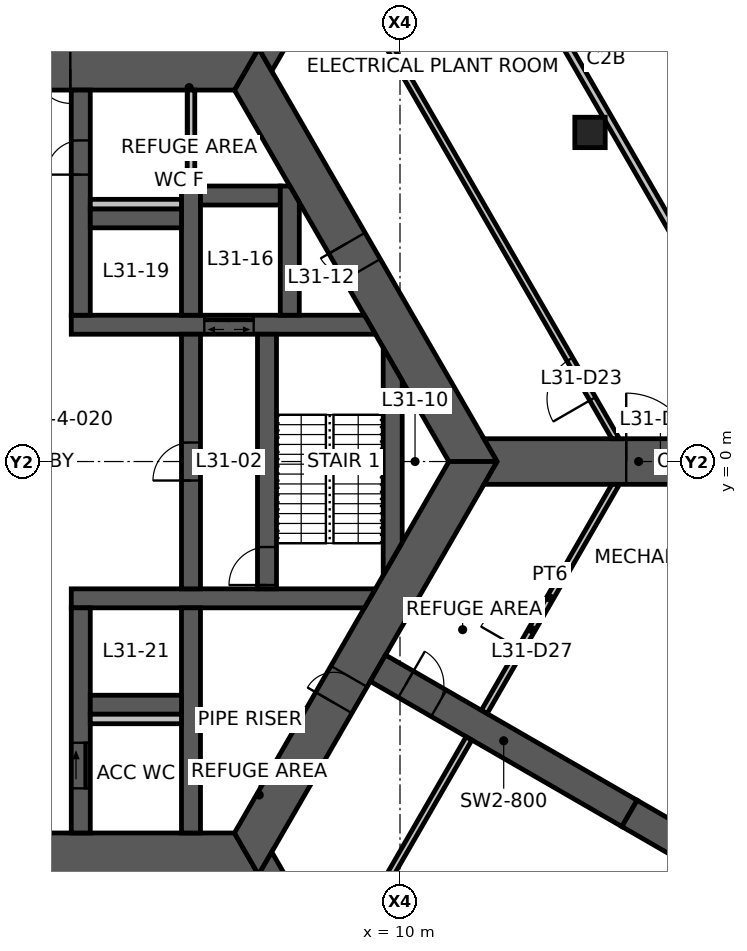
"""IFC4 building model, lengths in metres.
Left out: names, types, materials, properties, quantities, classifications, styles, units other than length and angle.
Written with IfcOpenShell. Run it as: python <this file> out.ifc"""

import sys

from ifc_helpers import new_model, si_unit, direction, frame, frame_2d, origin, origin_2d, place, context, subcontext, project, spatial, polyline, rectangle, hollow_rectangle, outline, extrude, element, fill, save


model = new_model("IFC4")
c1 = context("Model", 3, precision=1e-05, world=origin(), true_north=direction((0.0, 1.0)))
c2 = subcontext(c1, "Body", "Model", "MODEL_VIEW")
j1 = project(units=[si_unit("LENGTHUNIT", "METRE"), si_unit("PLANEANGLEUNIT", "RADIAN")], contexts=[c1])
p1 = place(None, origin())
s1 = spatial("IfcSite", under=j1, at=p1, CompositionType="ELEMENT")
p2 = place(p1, origin())
s2 = spatial("IfcBuilding", under=s1, at=p2, CompositionType="ELEMENT")
p3 = place(p2, frame((0.0, 0.0, 123.6)))
s3 = spatial("IfcBuildingStorey", under=s2, at=p3, CompositionType="ELEMENT", Elevation=123.6)
p4 = place(p3, frame((15.0, 8.66, 0.0), z_axis=(0.0, 0.0, 1.0), x_axis=(1.0, 0.0, 0.0)))
e1 = element("IfcColumn", 1, at=p4, inside=s3, PredefinedType="COLUMN", context=c2, shape_type="SweptSolid", body=[
    extrude(hollow_rectangle(XDim=0.8, YDim=0.8, WallThickness=0.045, at=origin_2d()), origin(), (0.0, 0.0, 1.0), 5.0),
])
p5 = place(p3, frame((11.922, 0.0, 0.0), z_axis=(0.0, 0.0, 1.0), x_axis=(-0.500004296715, 0.866022923061, 0.0)))
e2 = element("IfcWall", 2, at=p5, inside=s3, PredefinedType="SHEAR", context=c2, shape_type="SweptSolid", body=[
    extrude(outline(polyline([(-0.318, -0.55), (5.835, -0.55), (6.635, -0.55), (12.24, -0.55), (11.605, 0.55), (6.635, 0.55), (5.835, 0.55), (0.318, 0.55), (-0.318, -0.55)])), origin(), (0.0, 0.0, 1.0), 5.0),
])
p6 = place(p5, frame((5.835, 0.0, 0.0)))
e3 = element("IfcOpeningElement", 3, at=p6, cuts=e2, PredefinedType="OPENING", context=c2, shape_type="SweptSolid", body=[
    extrude(rectangle(XDim=0.8, YDim=2.1, at=frame_2d((0.4, 1.05))), frame((0.0, 0.56, 0.0), z_axis=(0.0, -1.0, 0.0), x_axis=(1.0, 0.0, 0.0)), (0.0, 0.0, 1.0), 1.12),
])
p7 = place(p3, frame((5.961, 10.325, 0.0), z_axis=(0.0, 0.0, 1.0), x_axis=(-1.0, 0.0, 0.0)))
e4 = element("IfcWall", 4, at=p7, inside=s3, PredefinedType="SHEAR", context=c2, shape_type="SweptSolid", body=[
    extrude(outline(polyline([(-0.318, -0.55), (4.636, -0.55), (5.536, -0.55), (6.386, -0.55), (7.286, -0.55), (12.24, -0.55), (11.605, 0.55), (7.286, 0.55), (6.386, 0.55), (5.536, 0.55), (4.636, 0.55), (0.318, 0.55), (-0.318, -0.55)])), origin(), (0.0, 0.0, 1.0), 5.0),
])
p8 = place(p7, frame((6.386, 0.0, 0.0)))
e5 = element("IfcOpeningElement", 5, at=p8, cuts=e4, PredefinedType="OPENING", context=c2, shape_type="SweptSolid", body=[
    extrude(rectangle(XDim=0.9, YDim=2.1, at=frame_2d((0.45, 1.05))), frame((0.0, 0.56, 0.0), z_axis=(0.0, -1.0, 0.0), x_axis=(1.0, 0.0, 0.0)), (0.0, 0.0, 1.0), 1.12),
])
p9 = place(p7, frame((4.636, 0.0, 0.0)))
e6 = element("IfcOpeningElement", 6, at=p9, cuts=e4, PredefinedType="OPENING", context=c2, shape_type="SweptSolid", body=[
    extrude(rectangle(XDim=0.9, YDim=2.1, at=frame_2d((0.45, 1.05))), frame((0.0, 0.56, 0.0), z_axis=(0.0, -1.0, 0.0), x_axis=(1.0, 0.0, 0.0)), (0.0, 0.0, 1.0), 1.12),
])
p10 = place(p3, frame((-5.961, -10.325, 0.0), z_axis=(0.0, 0.0, 1.0), x_axis=(1.0, 0.0, 0.0)))
e7 = element("IfcWall", 7, at=p10, inside=s3, PredefinedType="SHEAR", context=c2, shape_type="SweptSolid", body=[
    extrude(outline(polyline([(-0.318, -0.55), (5.461, -0.55), (6.461, -0.55), (12.24, -0.55), (11.605, 0.55), (6.461, 0.55), (5.461, 0.55), (0.318, 0.55), (-0.318, -0.55)])), origin(), (0.0, 0.0, 1.0), 5.0),
])
p11 = place(p10, frame((5.461, 0.0, 0.0)))
e8 = element("IfcOpeningElement", 8, at=p11, cuts=e7, PredefinedType="OPENING", context=c2, shape_type="SweptSolid", body=[
    extrude(rectangle(XDim=1.0, YDim=2.1, at=frame_2d((0.5, 1.05))), frame((0.0, 0.56, 0.0), z_axis=(0.0, -1.0, 0.0), x_axis=(1.0, 0.0, 0.0)), (0.0, 0.0, 1.0), 1.12),
])
p12 = place(p3, frame((5.961, -10.325, 0.0), z_axis=(0.0, 0.0, 1.0), x_axis=(0.500004296715, 0.866022923061, 0.0)))
e9 = element("IfcWall", 9, at=p12, inside=s3, PredefinedType="SHEAR", context=c2, shape_type="SweptSolid", body=[
    extrude(outline(polyline([(-0.318, -0.55), (4.594, -0.55), (5.394, -0.55), (12.24, -0.55), (11.605, 0.55), (5.394, 0.55), (4.594, 0.55), (0.318, 0.55), (-0.318, -0.55)])), origin(), (0.0, 0.0, 1.0), 5.0),
])
p13 = place(p12, frame((4.594, 0.0, 0.0)))
e10 = element("IfcOpeningElement", 10, at=p13, cuts=e9, PredefinedType="OPENING", context=c2, shape_type="SweptSolid", body=[
    extrude(rectangle(XDim=0.8, YDim=2.1, at=frame_2d((0.4, 1.05))), frame((0.0, 0.56, 0.0), z_axis=(0.0, -1.0, 0.0), x_axis=(1.0, 0.0, 0.0)), (0.0, 0.0, 1.0), 1.12),
])
p14 = place(p3, frame((9.418, -5.438, 0.0), z_axis=(0.0, 0.0, 1.0), x_axis=(0.866029782078, -0.499992416496, 0.0)))
e11 = element("IfcWall", 11, at=p14, inside=s3, PredefinedType="SHEAR", context=c2, shape_type="SweptSolid", body=[
    extrude(rectangle(XDim=7.646, YDim=0.8, at=frame_2d((3.823, 0.0))), origin(), (0.0, 0.0, 1.0), 5.0),
])
p15 = place(p14, frame((0.85, 0.0, 0.0)))
e12 = element("IfcOpeningElement", 12, at=p15, cuts=e11, PredefinedType="OPENING", context=c2, shape_type="SweptSolid", body=[
    extrude(rectangle(XDim=1.0, YDim=2.1, at=frame_2d((0.5, 1.05))), frame((0.0, 0.41, 0.0), z_axis=(0.0, -1.0, 0.0), x_axis=(1.0, 0.0, 0.0)), (0.0, 0.0, 1.0), 0.82),
])
p16 = place(p3, frame((16.039, -9.26, 0.0), z_axis=(0.0, 0.0, 1.0), x_axis=(0.866024837091, -0.50000098154, 0.0)))
e13 = element("IfcWall", 13, at=p16, inside=s3, PredefinedType="SHEAR", context=c2, shape_type="SweptSolid", body=[
    extrude(rectangle(XDim=13.0, YDim=0.8, at=frame_2d((6.5, 0.0))), origin(), (0.0, 0.0, 1.0), 5.0),
])
p17 = place(p3, frame((12.557, 0.0, -1.15), z_axis=(0.0, 0.0, 1.0), x_axis=(1.0, 0.0, 0.0)))
e14 = element("IfcWall", 14, at=p17, inside=s3, PredefinedType="SHEAR", context=c2, shape_type="SweptSolid", body=[
    extrude(outline(polyline([(-0.346, -0.6), (3.395, -0.6), (5.195, -0.6), (7.443, -0.6), (7.443, 0.6), (5.195, 0.6), (3.395, 0.6), (-0.346, 0.6), (0.0, 0.0), (-0.346, -0.6)])), origin(), (0.0, 0.0, 1.0), 6.15),
])
p18 = place(p17, frame((3.395, 0.0, 1.15)))
e15 = element("IfcOpeningElement", 15, at=p18, cuts=e14, PredefinedType="OPENING", context=c2, shape_type="SweptSolid", body=[
    extrude(rectangle(XDim=1.8, YDim=2.4, at=frame_2d((0.9, 1.2))), frame((0.0, 0.61, 0.0), z_axis=(0.0, -1.0, 0.0), x_axis=(1.0, 0.0, 0.0)), (0.0, 0.0, 1.0), 1.22),
])
for number, where, z_axis, x_axis in (
    (16, (6.279, 10.875, -1.15), (0.0, 0.0, 1.0), (0.5, 0.866, 0.0)),
    (17, (6.279, -10.875, -1.15), (0.0, 0.0, 1.0), (0.5, -0.866, 0.0)),
):
    element("IfcWall", number, at=place(p3, frame(where, z_axis=z_axis, x_axis=x_axis)), inside=s3, PredefinedType="SHEAR", context=c2, shape_type="SweptSolid", body=[
        extrude(outline(polyline([(-0.346, -0.6), (7.443, -0.6), (7.443, 0.6), (-0.346, 0.6), (0.0, 0.0), (-0.346, -0.6)])), origin(), (0.0, 0.0, 1.0), 6.15),
    ])
p19 = place(p3, frame((20.389, 0.526, 0.0), z_axis=(0.0, 0.0, 1.0), x_axis=(-0.499999841607, 0.866025495233, 0.0)))
e18 = element("IfcWall", 18, at=p19, inside=s3, PredefinedType="ELEMENTEDWALL", context=c2, shape_type="SweptSolid", body=[
    extrude(rectangle(XDim=19.479, YDim=0.2, at=frame_2d((9.739, 0.0))), origin(), (0.0, 0.0, 1.0), 5.0),
])
p20 = place(p3, frame((1.35, 3.6, 0.0), z_axis=(0.0, 0.0, 1.0), x_axis=(1.0, 0.0, 0.0)))
e19 = element("IfcWall", 19, at=p20, inside=s3, PredefinedType="SHEAR", context=c2, shape_type="SweptSolid", body=[
    extrude(outline(polyline([(0.0, -0.25), (3.5, -0.25), (4.8, -0.25), (8.003, -0.25), (7.714, 0.25), (4.8, 0.25), (3.5, 0.25), (0.0, 0.25), (0.0, -0.25)])), origin(), (0.0, 0.0, 1.0), 5.0),
])
p21 = place(p20, frame((3.5, 0.0, 0.0)))
e20 = element("IfcOpeningElement", 20, at=p21, cuts=e19, PredefinedType="OPENING", context=c2, shape_type="SweptSolid", body=[
    extrude(rectangle(XDim=1.3, YDim=2.1, at=frame_2d((0.65, 1.05))), frame((0.0, 0.26, 0.0), z_axis=(0.0, -1.0, 0.0), x_axis=(1.0, 0.0, 0.0)), (0.0, 0.0, 1.0), 0.52),
])
p22 = place(p3, frame((1.35, -3.6, 0.0), z_axis=(0.0, 0.0, 1.0), x_axis=(1.0, 0.0, 0.0)))
e21 = element("IfcWall", 21, at=p22, inside=s3, PredefinedType="SHEAR", context=c2, shape_type="SweptSolid", body=[
    extrude(outline(polyline([(0.0, -0.25), (7.714, -0.25), (8.003, 0.25), (0.0, 0.25), (0.0, -0.25)])), origin(), (0.0, 0.0, 1.0), 5.0),
])
p23 = place(p3, frame((1.6, 3.85, 0.0), z_axis=(0.0, 0.0, 1.0), x_axis=(0.0, 1.0, 0.0)))
e22 = element("IfcWall", 22, at=p23, inside=s3, PredefinedType="SHEAR", context=c2, shape_type="SweptSolid", body=[
    extrude(rectangle(XDim=5.925, YDim=0.5, at=frame_2d((2.962, 0.0))), origin(), (0.0, 0.0, 1.0), 5.0),
])
p24 = place(p23, frame((3.7, 0.0, 0.0)))
e23 = element("IfcOpeningElement", 23, at=p24, cuts=e22, PredefinedType="OPENING", context=c2, shape_type="SweptSolid", body=[
    extrude(rectangle(XDim=0.9, YDim=2.1, at=frame_2d((0.45, 1.05))), frame((0.0, 0.26, 0.0), z_axis=(0.0, -1.0, 0.0), x_axis=(1.0, 0.0, 0.0)), (0.0, 0.0, 1.0), 0.52),
])
p25 = place(p3, frame((1.6, -3.85, 0.0), z_axis=(0.0, 0.0, 1.0), x_axis=(0.0, -1.0, 0.0)))
e24 = element("IfcWall", 24, at=p25, inside=s3, PredefinedType="SHEAR", context=c2, shape_type="SweptSolid", body=[
    extrude(rectangle(XDim=5.925, YDim=0.5, at=frame_2d((2.962, 0.0))), origin(), (0.0, 0.0, 1.0), 5.0),
])
p26 = place(p25, frame((3.55, 0.0, 0.0)))
e25 = element("IfcOpeningElement", 25, at=p26, cuts=e24, PredefinedType="OPENING", context=c2, shape_type="SweptSolid", body=[
    extrude(rectangle(XDim=1.2, YDim=2.1, at=frame_2d((0.6, 1.05))), frame((0.0, 0.26, 0.0), z_axis=(0.0, -1.0, 0.0), x_axis=(1.0, 0.0, 0.0)), (0.0, 0.0, 1.0), 0.52),
])
p27 = place(p3, frame((4.5, -3.35, 0.0), z_axis=(0.0, 0.0, 1.0), x_axis=(0.0, 1.0, 0.0)))
e26 = element("IfcWall", 26, at=p27, inside=s3, PredefinedType="SHEAR", context=c2, shape_type="SweptSolid", body=[
    extrude(rectangle(XDim=6.7, YDim=0.5, at=frame_2d((3.35, 0.0))), origin(), (0.0, 0.0, 1.0), 5.0),
])
p28 = place(p27, frame((2.85, 0.0, 0.0)))
e27 = element("IfcOpeningElement", 27, at=p28, cuts=e26, PredefinedType="OPENING", context=c2, shape_type="SweptSolid", body=[
    extrude(rectangle(XDim=1.0, YDim=2.1, at=frame_2d((0.5, 1.05))), frame((0.0, 0.26, 0.0), z_axis=(0.0, -1.0, 0.0), x_axis=(1.0, 0.0, 0.0)), (0.0, 0.0, 1.0), 0.52),
])
p29 = place(p3, frame((6.5, -3.35, 0.0), z_axis=(0.0, 0.0, 1.0), x_axis=(0.0, 1.0, 0.0)))
e28 = element("IfcWall", 28, at=p29, inside=s3, PredefinedType="SHEAR", context=c2, shape_type="SweptSolid", body=[
    extrude(rectangle(XDim=6.7, YDim=0.5, at=frame_2d((3.35, 0.0))), origin(), (0.0, 0.0, 1.0), 5.0),
])
p30 = place(p29, frame((0.1, 0.0, 0.0)))
e29 = element("IfcOpeningElement", 29, at=p30, cuts=e28, PredefinedType="OPENING", context=c2, shape_type="SweptSolid", body=[
    extrude(rectangle(XDim=1.0, YDim=2.1, at=frame_2d((0.5, 1.05))), frame((0.0, 0.26, 0.0), z_axis=(0.0, -1.0, 0.0), x_axis=(1.0, 0.0, 0.0)), (0.0, 0.0, 1.0), 0.52),
])
p31 = place(p3, frame((4.5, 3.85, 0.0), z_axis=(0.0, 0.0, 1.0), x_axis=(0.0, 1.0, 0.0)))
e30 = element("IfcWall", 30, at=p31, inside=s3, PredefinedType="SHEAR", context=c2, shape_type="SweptSolid", body=[
    extrude(rectangle(XDim=3.4, YDim=0.5, at=frame_2d((1.7, 0.0))), origin(), (0.0, 0.0, 1.0), 5.0),
])
p32 = place(p3, frame((4.5, -3.85, 0.0), z_axis=(0.0, 0.0, 1.0), x_axis=(0.0, -1.0, 0.0)))
e31 = element("IfcWall", 31, at=p32, inside=s3, PredefinedType="SHEAR", context=c2, shape_type="SweptSolid", body=[
    extrude(rectangle(XDim=5.925, YDim=0.5, at=frame_2d((2.962, 0.0))), origin(), (0.0, 0.0, 1.0), 5.0),
])
for number, where, z_axis, x_axis in (
    (32, (1.85, 6.4, 0.0), (0.0, 0.0, 1.0), (1.0, 0.0, 0.0)),
    (33, (1.85, -6.4, 0.0), (0.0, 0.0, 1.0), (1.0, 0.0, 0.0)),
):
    element("IfcWall", number, at=place(p3, frame(where, z_axis=z_axis, x_axis=x_axis)), inside=s3, PredefinedType="SHEAR", context=c2, shape_type="SweptSolid", body=[
        extrude(rectangle(XDim=2.4, YDim=0.5, at=frame_2d((1.2, 0.0))), origin(), (0.0, 0.0, 1.0), 5.0),
    ])
p33 = place(p3, frame((4.75, 7.0, 0.0), z_axis=(0.0, 0.0, 1.0), x_axis=(1.0, 0.0, 0.0)))
e34 = element("IfcWall", 34, at=p33, inside=s3, PredefinedType="SHEAR", context=c2, shape_type="SweptSolid", body=[
    extrude(rectangle(XDim=2.1, YDim=0.5, at=frame_2d((1.05, 0.0))), origin(), (0.0, 0.0, 1.0), 5.0),
])
p34 = place(p3, frame((7.1, 3.85, 0.0), z_axis=(0.0, 0.0, 1.0), x_axis=(0.0, 1.0, 0.0)))
e35 = element("IfcWall", 35, at=p34, inside=s3, PredefinedType="SHEAR", context=c2, shape_type="SweptSolid", body=[
    extrude(outline(polyline([(0.0, -0.25), (2.969, -0.25), (3.4, 0.0), (3.4, 0.25), (0.0, 0.25), (0.0, -0.25)])), origin(), (0.0, 0.0, 1.0), 5.0),
])
p35 = place(p3, frame((9.808, -2.562, 0.0), z_axis=(0.0, 0.0, 1.0), x_axis=(0.0, 1.0, 0.0)))
e36 = element("IfcWall", 36, at=p35, inside=s3, PredefinedType="SHEAR", context=c2, shape_type="SweptSolid", body=[
    extrude(outline(polyline([(0.433, -0.25), (4.691, -0.25), (5.558, 0.25), (-0.433, 0.25), (0.433, -0.25)])), origin(), (0.0, 0.0, 1.0), 5.0),
])
p36 = place(p3, frame((4.5, 7.25, 0.0), z_axis=(0.0, 0.0, 1.0), x_axis=(0.0, 1.0, 0.0)))
e37 = element("IfcWall", 37, at=p36, inside=s3, PredefinedType="STANDARD", context=c2, shape_type="SweptSolid", body=[
    extrude(rectangle(XDim=2.525, YDim=0.2, at=frame_2d((1.262, 0.0))), origin(), (0.0, 0.0, 1.0), 5.0),
])
for number, where, z_axis, x_axis in (
    (38, (1.85, 6.775, 0.0), (0.0, 0.0, 1.0), (1.0, 0.0, 0.0)),
    (39, (1.85, -6.775, 0.0), (0.0, 0.0, 1.0), (1.0, 0.0, 0.0)),
):
    element("IfcWall", number, at=place(p3, frame(where, z_axis=z_axis, x_axis=x_axis)), inside=s3, PredefinedType="PLUMBINGWALL", context=c2, shape_type="SweptSolid", body=[
        extrude(rectangle(XDim=2.4, YDim=0.25, at=frame_2d((1.2, 0.0))), origin(), (0.0, 0.0, 1.0), 5.0),
    ])
p37 = place(p3, frame((15.675, 0.6, 0.0), z_axis=(0.0, 0.0, 1.0), x_axis=(-0.500003545903, 0.866023356546, 0.0)))
e40 = element("IfcWall", 40, at=p37, inside=s3, PredefinedType="PARTITIONING", context=c2, shape_type="SweptSolid", body=[
    extrude(outline(polyline([(-0.051, -0.087), (1.213, -0.087), (2.413, -0.087), (14.686, -0.087), (14.585, 0.087), (2.413, 0.087), (1.213, 0.087), (0.051, 0.087), (-0.051, -0.087)])), origin(), (0.0, 0.0, 1.0), 4.8),
])
p38 = place(p37, frame((1.213, 0.0, 0.0)))
e41 = element("IfcOpeningElement", 41, at=p38, cuts=e40, PredefinedType="OPENING", context=c2, shape_type="SweptSolid", body=[
    extrude(rectangle(XDim=1.2, YDim=2.1, at=frame_2d((0.6, 1.05))), frame((0.0, 0.098, 0.0), z_axis=(0.0, -1.0, 0.0), x_axis=(1.0, 0.0, 0.0)), (0.0, 0.0, 1.0), 0.195),
])
p39 = place(p3, frame((12.219, -6.587, 0.0), z_axis=(0.0, 0.0, 1.0), x_axis=(0.500005739714, 0.866022089933, 0.0)))
e42 = element("IfcWall", 42, at=p39, inside=s3, PredefinedType="PARTITIONING", context=c2, shape_type="SweptSolid", body=[
    extrude(outline(polyline([(0.0, -0.087), (1.9, -0.087), (3.1, -0.087), (6.964, -0.087), (6.863, 0.087), (3.1, 0.087), (1.9, 0.087), (0.0, 0.087), (0.0, -0.087)])), origin(), (0.0, 0.0, 1.0), 4.8),
])
p40 = place(p39, frame((1.9, 0.0, 0.0)))
e43 = element("IfcOpeningElement", 43, at=p40, cuts=e42, PredefinedType="OPENING", context=c2, shape_type="SweptSolid", body=[
    extrude(rectangle(XDim=1.2, YDim=2.1, at=frame_2d((0.6, 1.05))), frame((0.0, 0.098, 0.0), z_axis=(0.0, -1.0, 0.0), x_axis=(1.0, 0.0, 0.0)), (0.0, 0.0, 1.0), 0.195),
])
p41 = place(p3, frame((8.357, -13.275, 0.0), z_axis=(0.0, 0.0, 1.0), x_axis=(0.500005739714, 0.866022089933, 0.0)))
e44 = element("IfcWall", 44, at=p41, inside=s3, PredefinedType="PARTITIONING", context=c2, shape_type="SweptSolid", body=[
    extrude(outline(polyline([(-0.051, -0.087), (6.913, -0.087), (6.913, 0.087), (0.051, 0.087), (-0.051, -0.087)])), origin(), (0.0, 0.0, 1.0), 4.8),
])
p42 = place(p9, origin())
e45 = element("IfcDoor", 45, at=p42, inside=s3, OperationType="SINGLE_SWING_LEFT", PredefinedType="DOOR", context=c2, shape_type="SweptSolid", body=[
    extrude(rectangle(XDim=0.9, YDim=2.1, at=frame_2d((0.45, 1.05))), frame((0.0, 0.025, 0.0), z_axis=(0.0, -1.0, 0.0), x_axis=(1.0, 0.0, 0.0)), (0.0, 0.0, 1.0), 0.05),
])
fill(e6, e45)
p43 = place(p6, origin())
e46 = element("IfcDoor", 46, at=p43, inside=s3, OperationType="SINGLE_SWING_RIGHT", PredefinedType="DOOR", context=c2, shape_type="SweptSolid", body=[
    extrude(rectangle(XDim=0.8, YDim=2.1, at=frame_2d((0.4, 1.05))), frame((0.0, 0.025, 0.0), z_axis=(0.0, -1.0, 0.0), x_axis=(1.0, 0.0, 0.0)), (0.0, 0.0, 1.0), 0.05),
])
fill(e3, e46)
p44 = place(p13, origin())
e47 = element("IfcDoor", 47, at=p44, inside=s3, OperationType="SINGLE_SWING_LEFT", PredefinedType="DOOR", context=c2, shape_type="SweptSolid", body=[
    extrude(rectangle(XDim=0.8, YDim=2.1, at=frame_2d((0.4, 1.05))), frame((0.0, 0.025, 0.0), z_axis=(0.0, -1.0, 0.0), x_axis=(1.0, 0.0, 0.0)), (0.0, 0.0, 1.0), 0.05),
])
fill(e10, e47)
p45 = place(p28, origin())
e48 = element("IfcDoor", 48, at=p45, inside=s3, OperationType="SINGLE_SWING_LEFT", PredefinedType="DOOR", context=c2, shape_type="SweptSolid", body=[
    extrude(rectangle(XDim=1.0, YDim=2.1, at=frame_2d((0.5, 1.05))), frame((0.0, 0.025, 0.0), z_axis=(0.0, -1.0, 0.0), x_axis=(1.0, 0.0, 0.0)), (0.0, 0.0, 1.0), 0.05),
])
fill(e27, e48)
p46 = place(p30, origin())
e49 = element("IfcDoor", 49, at=p46, inside=s3, OperationType="SINGLE_SWING_LEFT", PredefinedType="DOOR", context=c2, shape_type="SweptSolid", body=[
    extrude(rectangle(XDim=1.0, YDim=2.1, at=frame_2d((0.5, 1.05))), frame((0.0, 0.025, 0.0), z_axis=(0.0, -1.0, 0.0), x_axis=(1.0, 0.0, 0.0)), (0.0, 0.0, 1.0), 0.05),
])
fill(e29, e49)
p47 = place(p24, origin())
e50 = element("IfcDoor", 50, at=p47, inside=s3, OperationType="SINGLE_SWING_LEFT", PredefinedType="DOOR", context=c2, shape_type="SweptSolid", body=[
    extrude(rectangle(XDim=0.9, YDim=2.1, at=frame_2d((0.45, 1.05))), frame((0.0, 0.025, 0.0), z_axis=(0.0, -1.0, 0.0), x_axis=(1.0, 0.0, 0.0)), (0.0, 0.0, 1.0), 0.05),
])
fill(e23, e50)
p48 = place(p26, origin())
e51 = element("IfcDoor", 51, at=p48, inside=s3, OperationType="SLIDING_TO_LEFT", PredefinedType="DOOR", context=c2, shape_type="SweptSolid", body=[
    extrude(rectangle(XDim=1.2, YDim=2.1, at=frame_2d((0.6, 1.05))), frame((0.0, 0.025, 0.0), z_axis=(0.0, -1.0, 0.0), x_axis=(1.0, 0.0, 0.0)), (0.0, 0.0, 1.0), 0.05),
])
fill(e25, e51)
p49 = place(p15, origin())
e52 = element("IfcDoor", 52, at=p49, inside=s3, OperationType="SINGLE_SWING_LEFT", PredefinedType="DOOR", context=c2, shape_type="SweptSolid", body=[
    extrude(rectangle(XDim=1.0, YDim=2.1, at=frame_2d((0.5, 1.05))), frame((0.0, 0.025, 0.0), z_axis=(0.0, -1.0, 0.0), x_axis=(1.0, 0.0, 0.0)), (0.0, 0.0, 1.0), 0.05),
])
fill(e12, e52)
p50 = place(p18, origin())
e53 = element("IfcDoor", 53, at=p50, inside=s3, OperationType="DOUBLE_DOOR_SINGLE_SWING", PredefinedType="DOOR", context=c2, shape_type="SweptSolid", body=[
    extrude(rectangle(XDim=1.8, YDim=2.4, at=frame_2d((0.9, 1.2))), frame((0.0, 0.025, 0.0), z_axis=(0.0, -1.0, 0.0), x_axis=(1.0, 0.0, 0.0)), (0.0, 0.0, 1.0), 0.05),
])
fill(e15, e53)
p51 = place(p38, origin())
e54 = element("IfcDoor", 54, at=p51, inside=s3, OperationType="DOUBLE_DOOR_SINGLE_SWING", PredefinedType="DOOR", context=c2, shape_type="SweptSolid", body=[
    extrude(rectangle(XDim=1.2, YDim=2.1, at=frame_2d((0.6, 1.05))), frame((0.0, 0.025, 0.0), z_axis=(0.0, -1.0, 0.0), x_axis=(1.0, 0.0, 0.0)), (0.0, 0.0, 1.0), 0.05),
])
fill(e41, e54)
p52 = place(p40, origin())
e55 = element("IfcDoor", 55, at=p52, inside=s3, OperationType="DOUBLE_DOOR_SINGLE_SWING", PredefinedType="DOOR", context=c2, shape_type="SweptSolid", body=[
    extrude(rectangle(XDim=1.2, YDim=2.1, at=frame_2d((0.6, 1.05))), frame((0.0, 0.025, 0.0), z_axis=(0.0, -1.0, 0.0), x_axis=(1.0, 0.0, 0.0)), (0.0, 0.0, 1.0), 0.05),
])
fill(e43, e55)
p53 = place(p21, origin())
e56 = element("IfcDoor", 56, at=p53, inside=s3, OperationType="DOUBLE_DOOR_SLIDING", PredefinedType="DOOR", context=c2, shape_type="SweptSolid", body=[
    extrude(rectangle(XDim=1.3, YDim=2.1, at=frame_2d((0.65, 1.05))), frame((0.0, 0.025, 0.0), z_axis=(0.0, -1.0, 0.0), x_axis=(1.0, 0.0, 0.0)), (0.0, 0.0, 1.0), 0.05),
])
fill(e20, e56)
save(model, sys.argv[1])
